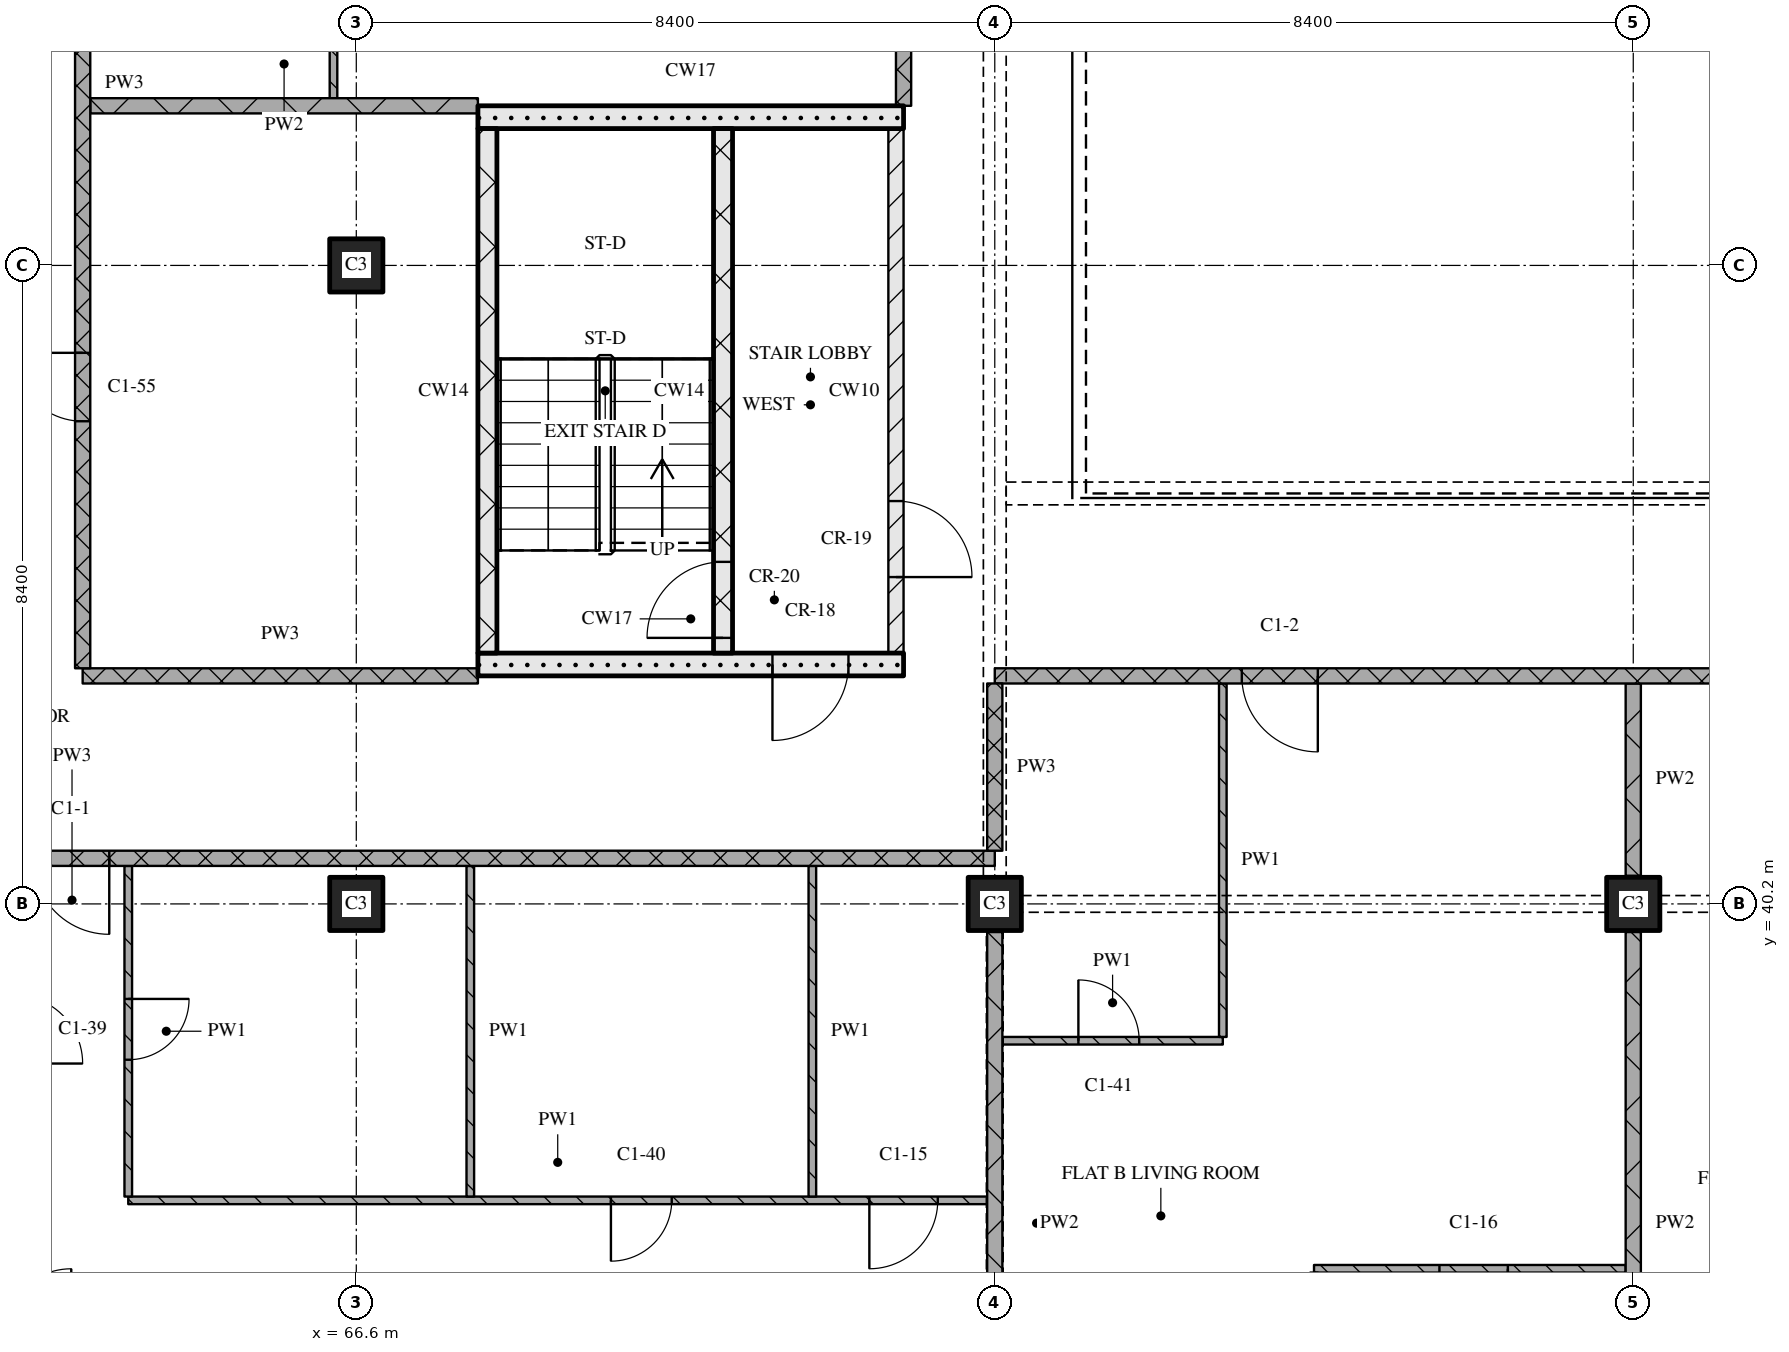
"""IFC4 building model, lengths in metres.
Left out: names, types, materials, properties, quantities, classifications, styles, units other than length and angle.
Written with IfcOpenShell. Run it as: python <this file> out.ifc"""

import sys

from ifc_helpers import new_model, si_unit, direction, frame, frame_2d, origin, origin_2d, place, context, subcontext, project, spatial, rectangle, extrude, element, fill, save


model = new_model("IFC4")
c1 = context("Model", 3, precision=1e-05, world=origin(), true_north=direction((0.0, 1.0)))
c2 = subcontext(c1, "Body", "Model", "MODEL_VIEW")
j1 = project(units=[si_unit("LENGTHUNIT", "METRE"), si_unit("PLANEANGLEUNIT", "RADIAN")], contexts=[c1])
p1 = place(None, origin())
s1 = spatial("IfcSite", under=j1, at=p1, CompositionType="ELEMENT")
p2 = place(p1, origin())
s2 = spatial("IfcBuilding", under=s1, at=p2, CompositionType="ELEMENT")
p3 = place(p2, frame((0.0, 0.0, 154.65)))
s3 = spatial("IfcBuildingStorey", under=s2, at=p3, CompositionType="ELEMENT", Elevation=154.65)
for number, where, z_axis, x_axis in (
    (1, (66.6, 40.2, 0.0), (0.0, 0.0, 1.0), (1.0, 0.0, 0.0)),
    (2, (66.6, 48.6, 0.0), (0.0, 0.0, 1.0), (1.0, 0.0, 0.0)),
    (3, (75.0, 40.2, 0.0), (0.0, 0.0, 1.0), (1.0, 0.0, 0.0)),
    (4, (83.4, 40.2, 0.0), (0.0, 0.0, 1.0), (1.0, 0.0, 0.0)),
):
    element("IfcColumn", number, at=place(p3, frame(where, z_axis=z_axis, x_axis=x_axis)), inside=s3, PredefinedType="COLUMN", context=c2, shape_type="SweptSolid", body=[
        extrude(rectangle(XDim=0.7, YDim=0.7, at=origin_2d()), origin(), (0.0, 0.0, 1.0), 3.6),
    ])
p4 = place(p3, frame((68.2, 43.35, 0.0), z_axis=(0.0, 0.0, 1.0), x_axis=(1.0, 0.0, 0.0)))
e5 = element("IfcWall", 5, at=p4, inside=s3, PredefinedType="SOLIDWALL", context=c2, shape_type="SweptSolid", body=[
    extrude(rectangle(XDim=5.6, YDim=0.3, at=frame_2d((2.8, 0.0))), origin(), (0.0, 0.0, 1.0), 3.32),
])
p5 = place(p4, frame((3.875, 0.0, 0.0)))
e6 = element("IfcOpeningElement", 6, at=p5, cuts=e5, PredefinedType="OPENING", context=c2, shape_type="SweptSolid", body=[
    extrude(rectangle(XDim=1.0, YDim=2.1, at=frame_2d((0.5, 1.05))), frame((0.0, 0.16, 0.0), z_axis=(0.0, -1.0, 0.0), x_axis=(1.0, 0.0, 0.0)), (0.0, 0.0, 1.0), 0.32),
])
p6 = place(p3, frame((68.325, 43.5, 0.0), z_axis=(0.0, 0.0, 1.0), x_axis=(0.0, 1.0, 0.0)))
e7 = element("IfcWall", 7, at=p6, inside=s3, PredefinedType="SOLIDWALL", context=c2, shape_type="SweptSolid", body=[
    extrude(rectangle(XDim=6.9, YDim=0.25, at=frame_2d((3.45, 0.0))), origin(), (0.0, 0.0, 1.0), 3.32),
])
p7 = place(p3, frame((71.425, 43.5, 0.0), z_axis=(0.0, 0.0, 1.0), x_axis=(0.0, 1.0, 0.0)))
e8 = element("IfcWall", 8, at=p7, inside=s3, PredefinedType="SOLIDWALL", context=c2, shape_type="SweptSolid", body=[
    extrude(rectangle(XDim=6.9, YDim=0.25, at=frame_2d((3.45, 0.0))), origin(), (0.0, 0.0, 1.0), 3.32),
])
p8 = place(p7, frame((0.2, 0.0, 0.0)))
e9 = element("IfcOpeningElement", 9, at=p8, cuts=e8, PredefinedType="OPENING", context=c2, shape_type="SweptSolid", body=[
    extrude(rectangle(XDim=1.0, YDim=2.1, at=frame_2d((0.5, 1.05))), frame((0.0, 0.135, 0.0), z_axis=(0.0, -1.0, 0.0), x_axis=(1.0, 0.0, 0.0)), (0.0, 0.0, 1.0), 0.27),
])
p9 = place(p3, frame((73.7, 43.5, 0.0), z_axis=(0.0, 0.0, 1.0), x_axis=(0.0, 1.0, 0.0)))
e10 = element("IfcWall", 10, at=p9, inside=s3, PredefinedType="PARTITIONING", context=c2, shape_type="SweptSolid", body=[
    extrude(rectangle(XDim=6.9, YDim=0.2, at=frame_2d((3.45, 0.0))), origin(), (0.0, 0.0, 1.0), 3.32),
])
p10 = place(p9, frame((1.0, 0.0, 0.0)))
e11 = element("IfcOpeningElement", 11, at=p10, cuts=e10, PredefinedType="OPENING", context=c2, shape_type="SweptSolid", body=[
    extrude(rectangle(XDim=1.0, YDim=2.1, at=frame_2d((0.5, 1.05))), frame((0.0, 0.11, 0.0), z_axis=(0.0, -1.0, 0.0), x_axis=(1.0, 0.0, 0.0)), (0.0, 0.0, 1.0), 0.22),
])
p11 = place(p3, frame((68.2, 50.55, 0.0), z_axis=(0.0, 0.0, 1.0), x_axis=(1.0, 0.0, 0.0)))
e12 = element("IfcWall", 12, at=p11, inside=s3, PredefinedType="SOLIDWALL", context=c2, shape_type="SweptSolid", body=[
    extrude(rectangle(XDim=5.6, YDim=0.3, at=frame_2d((2.8, 0.0))), origin(), (0.0, 0.0, 1.0), 3.32),
])
p12 = place(p3, frame((83.3, 35.4, 0.0), z_axis=(0.0, 0.0, 1.0), x_axis=(-1.0, 0.0, 0.0)))
e13 = element("IfcWall", 13, at=p12, inside=s3, PredefinedType="PARTITIONING", context=c2, shape_type="SweptSolid", body=[
    extrude(rectangle(XDim=4.1, YDim=0.1, at=frame_2d((2.05, 0.0))), origin(), (0.0, 0.0, 1.0), 3.32),
])
p13 = place(p12, frame((1.55, 0.0, 0.0)))
e14 = element("IfcOpeningElement", 14, at=p13, cuts=e13, PredefinedType="OPENING", context=c2, shape_type="SweptSolid", body=[
    extrude(rectangle(XDim=0.9, YDim=2.1, at=frame_2d((0.45, 1.05))), frame((0.0, 0.06, 0.0), z_axis=(0.0, -1.0, 0.0), x_axis=(1.0, 0.0, 0.0)), (0.0, 0.0, 1.0), 0.12),
])
p14 = place(p3, frame((63.6, 36.3, 0.0), z_axis=(0.0, 0.0, 1.0), x_axis=(1.0, 0.0, 0.0)))
e15 = element("IfcWall", 15, at=p14, inside=s3, PredefinedType="PARTITIONING", context=c2, shape_type="SweptSolid", body=[
    extrude(rectangle(XDim=11.3, YDim=0.1, at=frame_2d((5.65, 0.0))), origin(), (0.0, 0.0, 1.0), 3.32),
])
p15 = place(p14, frame((6.35, 0.0, 0.0)))
e16 = element("IfcOpeningElement", 16, at=p15, cuts=e15, PredefinedType="OPENING", context=c2, shape_type="SweptSolid", body=[
    extrude(rectangle(XDim=0.8, YDim=2.1, at=frame_2d((0.4, 1.05))), frame((0.0, 0.06, 0.0), z_axis=(0.0, -1.0, 0.0), x_axis=(1.0, 0.0, 0.0)), (0.0, 0.0, 1.0), 0.12),
])
p16 = place(p14, frame((9.75, 0.0, 0.0)))
e17 = element("IfcOpeningElement", 17, at=p16, cuts=e15, PredefinedType="OPENING", context=c2, shape_type="SweptSolid", body=[
    extrude(rectangle(XDim=0.9, YDim=2.1, at=frame_2d((0.45, 1.05))), frame((0.0, 0.06, 0.0), z_axis=(0.0, -1.0, 0.0), x_axis=(1.0, 0.0, 0.0)), (0.0, 0.0, 1.0), 0.12),
])
p17 = place(p3, frame((75.1, 38.4, 0.0), z_axis=(0.0, 0.0, 1.0), x_axis=(1.0, 0.0, 0.0)))
e18 = element("IfcWall", 18, at=p17, inside=s3, PredefinedType="PARTITIONING", context=c2, shape_type="SweptSolid", body=[
    extrude(rectangle(XDim=2.9, YDim=0.1, at=frame_2d((1.45, 0.0))), origin(), (0.0, 0.0, 1.0), 3.32),
])
p18 = place(p17, frame((1.0, 0.0, 0.0)))
e19 = element("IfcOpeningElement", 19, at=p18, cuts=e18, PredefinedType="OPENING", context=c2, shape_type="SweptSolid", body=[
    extrude(rectangle(XDim=0.8, YDim=2.1, at=frame_2d((0.4, 1.05))), frame((0.0, 0.06, 0.0), z_axis=(0.0, -1.0, 0.0), x_axis=(1.0, 0.0, 0.0)), (0.0, 0.0, 1.0), 0.12),
])
p19 = place(p3, frame((75.0, 40.8, 0.0), z_axis=(0.0, 0.0, 1.0), x_axis=(-1.0, 0.0, 0.0)))
e20 = element("IfcWall", 20, at=p19, inside=s3, PredefinedType="PARTITIONING", context=c2, shape_type="SweptSolid", body=[
    extrude(rectangle(XDim=24.28, YDim=0.2, at=frame_2d((12.14, 0.0))), origin(), (0.0, 0.0, 1.0), 3.32),
])
p20 = place(p19, frame((11.65, 0.0, 0.0)))
e21 = element("IfcOpeningElement", 21, at=p20, cuts=e20, PredefinedType="OPENING", context=c2, shape_type="SweptSolid", body=[
    extrude(rectangle(XDim=1.0, YDim=2.1, at=frame_2d((0.5, 1.05))), frame((0.0, 0.11, 0.0), z_axis=(0.0, -1.0, 0.0), x_axis=(1.0, 0.0, 0.0)), (0.0, 0.0, 1.0), 0.22),
])
p21 = place(p3, frame((63.0, 43.2, 0.0), z_axis=(0.0, 0.0, 1.0), x_axis=(1.0, 0.0, 0.0)))
e22 = element("IfcWall", 22, at=p21, inside=s3, PredefinedType="PARTITIONING", context=c2, shape_type="SweptSolid", body=[
    extrude(rectangle(XDim=5.2, YDim=0.2, at=frame_2d((2.6, 0.0))), origin(), (0.0, 0.0, 1.0), 3.32),
])
p22 = place(p3, frame((100.2, 43.2, 0.0), z_axis=(0.0, 0.0, 1.0), x_axis=(-1.0, 0.0, 0.0)))
e23 = element("IfcWall", 23, at=p22, inside=s3, PredefinedType="PARTITIONING", context=c2, shape_type="SweptSolid", body=[
    extrude(rectangle(XDim=25.2, YDim=0.2, at=frame_2d((12.6, 0.0))), origin(), (0.0, 0.0, 1.0), 3.32),
])
p23 = place(p22, frame((7.45, 0.0, 0.0)))
e24 = element("IfcOpeningElement", 24, at=p23, cuts=e23, PredefinedType="OPENING", context=c2, shape_type="SweptSolid", body=[
    extrude(rectangle(XDim=1.0, YDim=2.1, at=frame_2d((0.5, 1.05))), frame((0.0, 0.11, 0.0), z_axis=(0.0, -1.0, 0.0), x_axis=(1.0, 0.0, 0.0)), (0.0, 0.0, 1.0), 0.22),
])
p24 = place(p22, frame((20.95, 0.0, 0.0)))
e25 = element("IfcOpeningElement", 25, at=p24, cuts=e23, PredefinedType="OPENING", context=c2, shape_type="SweptSolid", body=[
    extrude(rectangle(XDim=1.0, YDim=2.1, at=frame_2d((0.5, 1.05))), frame((0.0, 0.11, 0.0), z_axis=(0.0, -1.0, 0.0), x_axis=(1.0, 0.0, 0.0)), (0.0, 0.0, 1.0), 0.22),
])
p25 = place(p3, frame((63.1, 50.7, 0.0), z_axis=(0.0, 0.0, 1.0), x_axis=(1.0, 0.0, 0.0)))
e26 = element("IfcWall", 26, at=p25, inside=s3, PredefinedType="PARTITIONING", context=c2, shape_type="SweptSolid", body=[
    extrude(rectangle(XDim=5.1, YDim=0.2, at=frame_2d((2.55, 0.0))), origin(), (0.0, 0.0, 1.0), 3.32),
])
p26 = place(p3, frame((63.0, 58.7, 0.0), z_axis=(0.0, 0.0, 1.0), x_axis=(0.0, -1.0, 0.0)))
e27 = element("IfcWall", 27, at=p26, inside=s3, PredefinedType="PARTITIONING", context=c2, shape_type="SweptSolid", body=[
    extrude(rectangle(XDim=15.4, YDim=0.2, at=frame_2d((7.7, 0.0))), origin(), (0.0, 0.0, 1.0), 3.32),
])
p27 = place(p26, frame((4.05, 0.0, 0.0)))
e28 = element("IfcOpeningElement", 28, at=p27, cuts=e27, PredefinedType="OPENING", context=c2, shape_type="SweptSolid", body=[
    extrude(rectangle(XDim=1.0, YDim=2.1, at=frame_2d((0.5, 1.05))), frame((0.0, 0.11, 0.0), z_axis=(0.0, -1.0, 0.0), x_axis=(1.0, 0.0, 0.0)), (0.0, 0.0, 1.0), 0.22),
])
p28 = place(p26, frame((11.25, 0.0, 0.0)))
e29 = element("IfcOpeningElement", 29, at=p28, cuts=e27, PredefinedType="OPENING", context=c2, shape_type="SweptSolid", body=[
    extrude(rectangle(XDim=0.9, YDim=2.1, at=frame_2d((0.45, 1.05))), frame((0.0, 0.11, 0.0), z_axis=(0.0, -1.0, 0.0), x_axis=(1.0, 0.0, 0.0)), (0.0, 0.0, 1.0), 0.22),
])
p29 = place(p3, frame((63.6, 40.7, 0.0), z_axis=(0.0, 0.0, 1.0), x_axis=(0.0, -1.0, 0.0)))
e30 = element("IfcWall", 30, at=p29, inside=s3, PredefinedType="PARTITIONING", context=c2, shape_type="SweptSolid", body=[
    extrude(rectangle(XDim=4.35, YDim=0.1, at=frame_2d((2.175, 0.0))), origin(), (0.0, 0.0, 1.0), 3.32),
])
p30 = place(p29, frame((1.75, 0.0, 0.0)))
e31 = element("IfcOpeningElement", 31, at=p30, cuts=e30, PredefinedType="OPENING", context=c2, shape_type="SweptSolid", body=[
    extrude(rectangle(XDim=0.8, YDim=2.1, at=frame_2d((0.4, 1.05))), frame((0.0, 0.06, 0.0), z_axis=(0.0, -1.0, 0.0), x_axis=(1.0, 0.0, 0.0)), (0.0, 0.0, 1.0), 0.12),
])
p31 = place(p3, frame((66.3, 50.8, 0.0), z_axis=(0.0, 0.0, 1.0), x_axis=(0.0, 1.0, 0.0)))
e32 = element("IfcWall", 32, at=p31, inside=s3, PredefinedType="PARTITIONING", context=c2, shape_type="SweptSolid", body=[
    extrude(rectangle(XDim=2.55, YDim=0.1, at=frame_2d((1.275, 0.0))), origin(), (0.0, 0.0, 1.0), 3.32),
])
p32 = place(p31, frame((0.85, 0.0, 0.0)))
e33 = element("IfcOpeningElement", 33, at=p32, cuts=e32, PredefinedType="OPENING", context=c2, shape_type="SweptSolid", body=[
    extrude(rectangle(XDim=0.8, YDim=2.1, at=frame_2d((0.4, 1.05))), frame((0.0, 0.06, 0.0), z_axis=(0.0, -1.0, 0.0), x_axis=(1.0, 0.0, 0.0)), (0.0, 0.0, 1.0), 0.12),
])
for number, where, z_axis, x_axis in (
    (34, (68.1, 40.7, 0.0), (0.0, 0.0, 1.0), (0.0, -1.0, 0.0)),
    (35, (72.6, 40.7, 0.0), (0.0, 0.0, 1.0), (0.0, -1.0, 0.0)),
):
    element("IfcWall", number, at=place(p3, frame(where, z_axis=z_axis, x_axis=x_axis)), inside=s3, PredefinedType="PARTITIONING", context=c2, shape_type="SweptSolid", body=[
        extrude(rectangle(XDim=4.35, YDim=0.1, at=frame_2d((2.175, 0.0))), origin(), (0.0, 0.0, 1.0), 3.32),
    ])
p33 = place(p3, frame((73.8, 58.7, 0.0), z_axis=(0.0, 0.0, 1.0), x_axis=(0.0, -1.0, 0.0)))
e36 = element("IfcWall", 36, at=p33, inside=s3, PredefinedType="PARTITIONING", context=c2, shape_type="SweptSolid", body=[
    extrude(rectangle(XDim=8.0, YDim=0.2, at=frame_2d((4.0, 0.0))), origin(), (0.0, 0.0, 1.0), 3.32),
])
p34 = place(p33, frame((1.225, 0.0, 0.9)))
e37 = element("IfcOpeningElement", 37, at=p34, cuts=e36, PredefinedType="OPENING", context=c2, shape_type="SweptSolid", body=[
    extrude(rectangle(XDim=1.5, YDim=1.5, at=frame_2d((0.75, 0.75))), frame((0.0, 0.11, 0.0), z_axis=(0.0, -1.0, 0.0), x_axis=(1.0, 0.0, 0.0)), (0.0, 0.0, 1.0), 0.22),
])
p35 = place(p3, frame((75.0, 43.1, 0.0), z_axis=(0.0, 0.0, 1.0), x_axis=(0.0, -1.0, 0.0)))
e38 = element("IfcWall", 38, at=p35, inside=s3, PredefinedType="PARTITIONING", context=c2, shape_type="SweptSolid", body=[
    extrude(rectangle(XDim=2.2, YDim=0.2, at=frame_2d((1.1, 0.0))), origin(), (0.0, 0.0, 1.0), 2.43),
])
p36 = place(p3, frame((75.0, 39.83, 0.0), z_axis=(0.0, 0.0, 1.0), x_axis=(0.0, -1.0, 0.0)))
e39 = element("IfcWall", 39, at=p36, inside=s3, PredefinedType="PARTITIONING", context=c2, shape_type="SweptSolid", body=[
    extrude(rectangle(XDim=7.66, YDim=0.2, at=frame_2d((3.83, 0.0))), origin(), (0.0, 0.0, 1.0), 2.72),
])
p37 = place(p3, frame((78.0, 43.1, 0.0), z_axis=(0.0, 0.0, 1.0), x_axis=(0.0, -1.0, 0.0)))
e40 = element("IfcWall", 40, at=p37, inside=s3, PredefinedType="PARTITIONING", context=c2, shape_type="SweptSolid", body=[
    extrude(rectangle(XDim=4.65, YDim=0.1, at=frame_2d((2.325, 0.0))), origin(), (0.0, 0.0, 1.0), 3.32),
])
p38 = place(p3, frame((83.4, 39.83, 0.0), z_axis=(0.0, 0.0, 1.0), x_axis=(0.0, -1.0, 0.0)))
e41 = element("IfcWall", 41, at=p38, inside=s3, PredefinedType="PARTITIONING", context=c2, shape_type="SweptSolid", body=[
    extrude(rectangle(XDim=7.66, YDim=0.2, at=frame_2d((3.83, 0.0))), origin(), (0.0, 0.0, 1.0), 3.32),
])
p39 = place(p3, frame((83.4, 43.1, 0.0), z_axis=(0.0, 0.0, 1.0), x_axis=(0.0, -1.0, 0.0)))
e42 = element("IfcWall", 42, at=p39, inside=s3, PredefinedType="PARTITIONING", context=c2, shape_type="SweptSolid", body=[
    extrude(rectangle(XDim=2.53, YDim=0.2, at=frame_2d((1.265, 0.0))), origin(), (0.0, 0.0, 1.0), 3.32),
])
p40 = place(p5, origin())
e43 = element("IfcDoor", 43, at=p40, inside=s3, OperationType="SINGLE_SWING_RIGHT", PredefinedType="DOOR", context=c2, shape_type="SweptSolid", body=[
    extrude(rectangle(XDim=1.0, YDim=2.1, at=frame_2d((0.5, 1.05))), frame((0.0, 0.025, 0.0), z_axis=(0.0, -1.0, 0.0), x_axis=(1.0, 0.0, 0.0)), (0.0, 0.0, 1.0), 0.05),
])
fill(e6, e43)
p41 = place(p8, origin())
e44 = element("IfcDoor", 44, at=p41, inside=s3, OperationType="SINGLE_SWING_LEFT", PredefinedType="DOOR", context=c2, shape_type="SweptSolid", body=[
    extrude(rectangle(XDim=1.0, YDim=2.1, at=frame_2d((0.5, 1.05))), frame((0.0, 0.025, 0.0), z_axis=(0.0, -1.0, 0.0), x_axis=(1.0, 0.0, 0.0)), (0.0, 0.0, 1.0), 0.05),
])
fill(e9, e44)
p42 = place(p10, origin())
e45 = element("IfcDoor", 45, at=p42, inside=s3, OperationType="SINGLE_SWING_RIGHT", PredefinedType="DOOR", context=c2, shape_type="SweptSolid", body=[
    extrude(rectangle(XDim=1.0, YDim=2.1, at=frame_2d((0.5, 1.05))), frame((0.0, 0.025, 0.0), z_axis=(0.0, -1.0, 0.0), x_axis=(1.0, 0.0, 0.0)), (0.0, 0.0, 1.0), 0.05),
])
fill(e11, e45)
p43 = place(p13, origin())
e46 = element("IfcDoor", 46, at=p43, inside=s3, OperationType="SINGLE_SWING_LEFT", PredefinedType="DOOR", context=c2, shape_type="SweptSolid", body=[
    extrude(rectangle(XDim=0.9, YDim=2.1, at=frame_2d((0.45, 1.05))), frame((0.0, 0.025, 0.0), z_axis=(0.0, -1.0, 0.0), x_axis=(1.0, 0.0, 0.0)), (0.0, 0.0, 1.0), 0.05),
])
fill(e14, e46)
p44 = place(p15, origin())
e47 = element("IfcDoor", 47, at=p44, inside=s3, OperationType="SINGLE_SWING_RIGHT", PredefinedType="DOOR", context=c2, shape_type="SweptSolid", body=[
    extrude(rectangle(XDim=0.8, YDim=2.1, at=frame_2d((0.4, 1.05))), frame((0.0, 0.025, 0.0), z_axis=(0.0, -1.0, 0.0), x_axis=(1.0, 0.0, 0.0)), (0.0, 0.0, 1.0), 0.05),
])
fill(e16, e47)
p45 = place(p16, origin())
e48 = element("IfcDoor", 48, at=p45, inside=s3, OperationType="SINGLE_SWING_RIGHT", PredefinedType="DOOR", context=c2, shape_type="SweptSolid", body=[
    extrude(rectangle(XDim=0.9, YDim=2.1, at=frame_2d((0.45, 1.05))), frame((0.0, 0.025, 0.0), z_axis=(0.0, -1.0, 0.0), x_axis=(1.0, 0.0, 0.0)), (0.0, 0.0, 1.0), 0.05),
])
fill(e17, e48)
p46 = place(p18, origin())
e49 = element("IfcDoor", 49, at=p46, inside=s3, OperationType="SINGLE_SWING_LEFT", PredefinedType="DOOR", context=c2, shape_type="SweptSolid", body=[
    extrude(rectangle(XDim=0.8, YDim=2.1, at=frame_2d((0.4, 1.05))), frame((0.0, 0.025, 0.0), z_axis=(0.0, -1.0, 0.0), x_axis=(1.0, 0.0, 0.0)), (0.0, 0.0, 1.0), 0.05),
])
fill(e19, e49)
p47 = place(p20, origin())
e50 = element("IfcDoor", 50, at=p47, inside=s3, OperationType="SINGLE_SWING_LEFT", PredefinedType="DOOR", context=c2, shape_type="SweptSolid", body=[
    extrude(rectangle(XDim=1.0, YDim=2.1, at=frame_2d((0.5, 1.05))), frame((0.0, 0.025, 0.0), z_axis=(0.0, -1.0, 0.0), x_axis=(1.0, 0.0, 0.0)), (0.0, 0.0, 1.0), 0.05),
])
fill(e21, e50)
p48 = place(p24, origin())
e51 = element("IfcDoor", 51, at=p48, inside=s3, OperationType="SINGLE_SWING_LEFT", PredefinedType="DOOR", context=c2, shape_type="SweptSolid", body=[
    extrude(rectangle(XDim=1.0, YDim=2.1, at=frame_2d((0.5, 1.05))), frame((0.0, 0.025, 0.0), z_axis=(0.0, -1.0, 0.0), x_axis=(1.0, 0.0, 0.0)), (0.0, 0.0, 1.0), 0.05),
])
fill(e25, e51)
p49 = place(p28, origin())
e52 = element("IfcDoor", 52, at=p49, inside=s3, OperationType="SINGLE_SWING_RIGHT", PredefinedType="DOOR", context=c2, shape_type="SweptSolid", body=[
    extrude(rectangle(XDim=0.9, YDim=2.1, at=frame_2d((0.45, 1.05))), frame((0.0, 0.025, 0.0), z_axis=(0.0, -1.0, 0.0), x_axis=(1.0, 0.0, 0.0)), (0.0, 0.0, 1.0), 0.05),
])
fill(e29, e52)
p50 = place(p30, origin())
e53 = element("IfcDoor", 53, at=p50, inside=s3, OperationType="SINGLE_SWING_LEFT", PredefinedType="DOOR", context=c2, shape_type="SweptSolid", body=[
    extrude(rectangle(XDim=0.8, YDim=2.1, at=frame_2d((0.4, 1.05))), frame((0.0, 0.025, 0.0), z_axis=(0.0, -1.0, 0.0), x_axis=(1.0, 0.0, 0.0)), (0.0, 0.0, 1.0), 0.05),
])
fill(e31, e53)
save(model, sys.argv[1])
